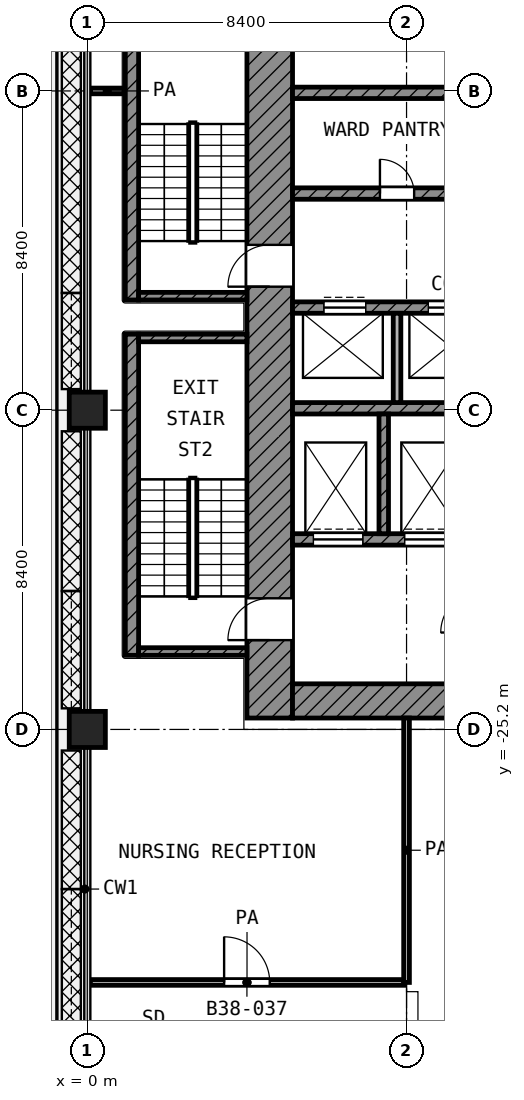
"""IFC4 building model, lengths in metres.
Left out: names, types, materials, properties, quantities, classifications, styles, units other than length and angle.
Written with IfcOpenShell. Run it as: python <this file> out.ifc"""

import sys

from ifc_helpers import new_model, si_unit, direction, frame, frame_2d, origin, origin_2d, place, context, subcontext, project, spatial, rectangle, extrude, element, fill, save


model = new_model("IFC4")
c1 = context("Model", 3, precision=1e-05, world=origin(), true_north=direction((0.0, 1.0)))
c2 = subcontext(c1, "Body", "Model", "MODEL_VIEW")
j1 = project(units=[si_unit("LENGTHUNIT", "METRE"), si_unit("PLANEANGLEUNIT", "RADIAN")], contexts=[c1])
p1 = place(None, origin())
s1 = spatial("IfcSite", under=j1, at=p1, CompositionType="ELEMENT")
p2 = place(p1, origin())
s2 = spatial("IfcBuilding", under=s1, at=p2, CompositionType="ELEMENT")
p3 = place(p2, frame((0.0, 0.0, 166.8)))
s3 = spatial("IfcBuildingStorey", under=s2, at=p3, CompositionType="ELEMENT", Elevation=166.8)
for number, where, z_axis, x_axis in (
    (1, (0.0, -16.8, 0.0), (0.0, 0.0, 1.0), (1.0, 0.0, 0.0)),
    (2, (0.0, -25.2, 0.0), (0.0, 0.0, 1.0), (1.0, 0.0, 0.0)),
):
    element("IfcColumn", number, at=place(p3, frame(where, z_axis=z_axis, x_axis=x_axis)), inside=s3, PredefinedType="COLUMN", context=c2, shape_type="SweptSolid", body=[
        extrude(rectangle(XDim=0.95, YDim=0.95, at=origin_2d()), origin(), (0.0, 0.0, 1.0), 4.2),
    ])
p4 = place(p3, frame((4.8, -24.9, 0.0), z_axis=(0.0, 0.0, 1.0), x_axis=(0.0, 1.0, 0.0)))
e3 = element("IfcWall", 3, at=p4, inside=s3, PredefinedType="SHEAR", context=c2, shape_type="SweptSolid", body=[
    extrude(rectangle(XDim=19.5, YDim=1.2, at=frame_2d((9.75, 0.0))), origin(), (0.0, 0.0, 1.0), 3.6),
])
p5 = place(p4, frame((11.35, 0.0, 0.0)))
e4 = element("IfcOpeningElement", 4, at=p5, cuts=e3, PredefinedType="OPENING", context=c2, shape_type="SweptSolid", body=[
    extrude(rectangle(XDim=1.1, YDim=2.1, at=frame_2d((0.55, 1.05))), frame((0.0, 0.61, 0.0), z_axis=(0.0, -1.0, 0.0), x_axis=(1.0, 0.0, 0.0)), (0.0, 0.0, 1.0), 1.22),
])
p6 = place(p4, frame((2.05, 0.0, 0.0)))
e5 = element("IfcOpeningElement", 5, at=p6, cuts=e3, PredefinedType="OPENING", context=c2, shape_type="SweptSolid", body=[
    extrude(rectangle(XDim=1.1, YDim=2.1, at=frame_2d((0.55, 1.05))), frame((0.0, 0.61, 0.0), z_axis=(0.0, -1.0, 0.0), x_axis=(1.0, 0.0, 0.0)), (0.0, 0.0, 1.0), 1.22),
])
p7 = place(p3, frame((5.4, -24.45, 0.0), z_axis=(0.0, 0.0, 1.0), x_axis=(1.0, 0.0, 0.0)))
e6 = element("IfcWall", 6, at=p7, inside=s3, PredefinedType="SHEAR", context=c2, shape_type="SweptSolid", body=[
    extrude(rectangle(XDim=18.6, YDim=0.9, at=frame_2d((9.3, 0.0))), origin(), (0.0, 0.0, 1.0), 3.6),
])
p8 = place(p7, frame((6.3, 0.0, 0.0)))
e7 = element("IfcOpeningElement", 7, at=p8, cuts=e6, PredefinedType="OPENING", context=c2, shape_type="SweptSolid", body=[
    extrude(rectangle(XDim=1.8, YDim=2.1, at=frame_2d((0.9, 1.05))), frame((0.0, 0.46, 0.0), z_axis=(0.0, -1.0, 0.0), x_axis=(1.0, 0.0, 0.0)), (0.0, 0.0, 1.0), 0.92),
])
p9 = place(p3, frame((5.4, -8.45, 0.0), z_axis=(0.0, 0.0, 1.0), x_axis=(1.0, 0.0, 0.0)))
e8 = element("IfcWall", 8, at=p9, inside=s3, PredefinedType="SHEAR", context=c2, shape_type="SweptSolid", body=[
    extrude(rectangle(XDim=16.65, YDim=0.3, at=frame_2d((8.325, 0.0))), origin(), (0.0, 0.0, 1.0), 3.6),
])
p10 = place(p3, frame((5.4, -11.1, 0.0), z_axis=(0.0, 0.0, 1.0), x_axis=(1.0, 0.0, 0.0)))
e9 = element("IfcWall", 9, at=p10, inside=s3, PredefinedType="SHEAR", context=c2, shape_type="SweptSolid", body=[
    extrude(rectangle(XDim=16.65, YDim=0.3, at=frame_2d((8.325, 0.0))), origin(), (0.0, 0.0, 1.0), 3.6),
])
p11 = place(p10, frame((11.825, 0.0, 0.0)))
e10 = element("IfcOpeningElement", 10, at=p11, cuts=e9, PredefinedType="OPENING", context=c2, shape_type="SweptSolid", body=[
    extrude(rectangle(XDim=1.1, YDim=2.1, at=frame_2d((0.55, 1.05))), frame((0.0, 0.16, 0.0), z_axis=(0.0, -1.0, 0.0), x_axis=(1.0, 0.0, 0.0)), (0.0, 0.0, 1.0), 0.32),
])
p12 = place(p10, frame((14.575, 0.0, 0.0)))
e11 = element("IfcOpeningElement", 11, at=p12, cuts=e9, PredefinedType="OPENING", context=c2, shape_type="SweptSolid", body=[
    extrude(rectangle(XDim=1.1, YDim=2.1, at=frame_2d((0.55, 1.05))), frame((0.0, 0.16, 0.0), z_axis=(0.0, -1.0, 0.0), x_axis=(1.0, 0.0, 0.0)), (0.0, 0.0, 1.0), 0.32),
])
p13 = place(p10, frame((2.3, 0.0, 0.0)))
e12 = element("IfcOpeningElement", 12, at=p13, cuts=e9, PredefinedType="OPENING", context=c2, shape_type="SweptSolid", body=[
    extrude(rectangle(XDim=0.9, YDim=2.1, at=frame_2d((0.45, 1.05))), frame((0.0, 0.16, 0.0), z_axis=(0.0, -1.0, 0.0), x_axis=(1.0, 0.0, 0.0)), (0.0, 0.0, 1.0), 0.32),
])
p14 = place(p10, frame((7.8, 0.0, 0.0)))
e13 = element("IfcOpeningElement", 13, at=p14, cuts=e9, PredefinedType="OPENING", context=c2, shape_type="SweptSolid", body=[
    extrude(rectangle(XDim=0.9, YDim=2.1, at=frame_2d((0.45, 1.05))), frame((0.0, 0.16, 0.0), z_axis=(0.0, -1.0, 0.0), x_axis=(1.0, 0.0, 0.0)), (0.0, 0.0, 1.0), 0.32),
])
p15 = place(p3, frame((5.4, -14.1, 0.0), z_axis=(0.0, 0.0, 1.0), x_axis=(1.0, 0.0, 0.0)))
e14 = element("IfcWall", 14, at=p15, inside=s3, PredefinedType="SHEAR", context=c2, shape_type="SweptSolid", body=[
    extrude(rectangle(XDim=16.65, YDim=0.3, at=frame_2d((8.325, 0.0))), origin(), (0.0, 0.0, 1.0), 3.6),
])
p16 = place(p15, frame((0.825, 0.0, 0.0)))
e15 = element("IfcOpeningElement", 15, at=p16, cuts=e14, PredefinedType="OPENING", context=c2, shape_type="SweptSolid", body=[
    extrude(rectangle(XDim=1.1, YDim=2.1, at=frame_2d((0.55, 1.05))), frame((0.0, 0.16, 0.0), z_axis=(0.0, -1.0, 0.0), x_axis=(1.0, 0.0, 0.0)), (0.0, 0.0, 1.0), 0.32),
])
p17 = place(p15, frame((3.575, 0.0, 0.0)))
e16 = element("IfcOpeningElement", 16, at=p17, cuts=e14, PredefinedType="OPENING", context=c2, shape_type="SweptSolid", body=[
    extrude(rectangle(XDim=1.1, YDim=2.1, at=frame_2d((0.55, 1.05))), frame((0.0, 0.16, 0.0), z_axis=(0.0, -1.0, 0.0), x_axis=(1.0, 0.0, 0.0)), (0.0, 0.0, 1.0), 0.32),
])
p18 = place(p3, frame((5.4, -16.75, 0.0), z_axis=(0.0, 0.0, 1.0), x_axis=(1.0, 0.0, 0.0)))
e17 = element("IfcWall", 17, at=p18, inside=s3, PredefinedType="SHEAR", context=c2, shape_type="SweptSolid", body=[
    extrude(rectangle(XDim=16.65, YDim=0.3, at=frame_2d((8.325, 0.0))), origin(), (0.0, 0.0, 1.0), 3.6),
])
p19 = place(p3, frame((5.4, -20.2, 0.0), z_axis=(0.0, 0.0, 1.0), x_axis=(1.0, 0.0, 0.0)))
e18 = element("IfcWall", 18, at=p19, inside=s3, PredefinedType="SHEAR", context=c2, shape_type="SweptSolid", body=[
    extrude(rectangle(XDim=14.65, YDim=0.3, at=frame_2d((7.325, 0.0))), origin(), (0.0, 0.0, 1.0), 3.6),
])
p20 = place(p19, frame((10.55, 0.0, 0.0)))
e19 = element("IfcOpeningElement", 19, at=p20, cuts=e18, PredefinedType="OPENING", context=c2, shape_type="SweptSolid", body=[
    extrude(rectangle(XDim=1.3, YDim=2.1, at=frame_2d((0.65, 1.05))), frame((0.0, 0.16, 0.0), z_axis=(0.0, -1.0, 0.0), x_axis=(1.0, 0.0, 0.0)), (0.0, 0.0, 1.0), 0.32),
])
p21 = place(p19, frame((12.95, 0.0, 0.0)))
e20 = element("IfcOpeningElement", 20, at=p21, cuts=e18, PredefinedType="OPENING", context=c2, shape_type="SweptSolid", body=[
    extrude(rectangle(XDim=1.3, YDim=2.1, at=frame_2d((0.65, 1.05))), frame((0.0, 0.16, 0.0), z_axis=(0.0, -1.0, 0.0), x_axis=(1.0, 0.0, 0.0)), (0.0, 0.0, 1.0), 0.32),
])
p22 = place(p19, frame((0.55, 0.0, 0.0)))
e21 = element("IfcOpeningElement", 21, at=p22, cuts=e18, PredefinedType="OPENING", context=c2, shape_type="SweptSolid", body=[
    extrude(rectangle(XDim=1.3, YDim=2.1, at=frame_2d((0.65, 1.05))), frame((0.0, 0.16, 0.0), z_axis=(0.0, -1.0, 0.0), x_axis=(1.0, 0.0, 0.0)), (0.0, 0.0, 1.0), 0.32),
])
p23 = place(p19, frame((2.95, 0.0, 0.0)))
e22 = element("IfcOpeningElement", 22, at=p23, cuts=e18, PredefinedType="OPENING", context=c2, shape_type="SweptSolid", body=[
    extrude(rectangle(XDim=1.3, YDim=2.1, at=frame_2d((0.65, 1.05))), frame((0.0, 0.16, 0.0), z_axis=(0.0, -1.0, 0.0), x_axis=(1.0, 0.0, 0.0)), (0.0, 0.0, 1.0), 0.32),
])
p24 = place(p19, frame((7.15, 0.0, 0.0)))
e23 = element("IfcOpeningElement", 23, at=p24, cuts=e18, PredefinedType="OPENING", context=c2, shape_type="SweptSolid", body=[
    extrude(rectangle(XDim=0.9, YDim=2.1, at=frame_2d((0.45, 1.05))), frame((0.0, 0.16, 0.0), z_axis=(0.0, -1.0, 0.0), x_axis=(1.0, 0.0, 0.0)), (0.0, 0.0, 1.0), 0.32),
])
p25 = place(p3, frame((7.8, -20.05, 0.0), z_axis=(0.0, 0.0, 1.0), x_axis=(0.0, 1.0, 0.0)))
e24 = element("IfcWall", 24, at=p25, inside=s3, PredefinedType="SHEAR", context=c2, shape_type="SweptSolid", body=[
    extrude(rectangle(XDim=3.15, YDim=0.25, at=frame_2d((1.575, 0.0))), origin(), (0.0, 0.0, 1.0), 3.6),
])
p26 = place(p3, frame((8.15, -16.6, 0.0), z_axis=(0.0, 0.0, 1.0), x_axis=(0.0, 1.0, 0.0)))
e25 = element("IfcWall", 25, at=p26, inside=s3, PredefinedType="PARTITIONING", context=c2, shape_type="SweptSolid", body=[
    extrude(rectangle(XDim=2.35, YDim=0.2, at=frame_2d((1.175, 0.0))), origin(), (0.0, 0.0, 1.0), 3.6),
])
p27 = place(p3, frame((1.175, -13.9, 0.0), z_axis=(0.0, 0.0, 1.0), x_axis=(0.0, 1.0, 0.0)))
e26 = element("IfcWall", 26, at=p27, inside=s3, PredefinedType="SHEAR", context=c2, shape_type="SweptSolid", body=[
    extrude(rectangle(XDim=8.45, YDim=0.35, at=frame_2d((4.225, 0.0))), origin(), (0.0, 0.0, 1.0), 3.6),
])
p28 = place(p3, frame((1.35, -13.8, 0.0), z_axis=(0.0, 0.0, 1.0), x_axis=(1.0, 0.0, 0.0)))
e27 = element("IfcWall", 27, at=p28, inside=s3, PredefinedType="SHEAR", context=c2, shape_type="SweptSolid", body=[
    extrude(rectangle(XDim=2.85, YDim=0.2, at=frame_2d((1.425, 0.0))), origin(), (0.0, 0.0, 1.0), 3.6),
])
p29 = place(p3, frame((1.175, -23.25, 0.0), z_axis=(0.0, 0.0, 1.0), x_axis=(0.0, 1.0, 0.0)))
e28 = element("IfcWall", 28, at=p29, inside=s3, PredefinedType="SHEAR", context=c2, shape_type="SweptSolid", body=[
    extrude(rectangle(XDim=8.45, YDim=0.35, at=frame_2d((4.225, 0.0))), origin(), (0.0, 0.0, 1.0), 3.6),
])
for number, where, z_axis, x_axis in (
    (29, (1.35, -14.9, 0.0), (0.0, 0.0, 1.0), (1.0, 0.0, 0.0)),
    (30, (1.35, -23.15, 0.0), (0.0, 0.0, 1.0), (1.0, 0.0, 0.0)),
):
    element("IfcWall", number, at=place(p3, frame(where, z_axis=z_axis, x_axis=x_axis)), inside=s3, PredefinedType="SHEAR", context=c2, shape_type="SweptSolid", body=[
        extrude(rectangle(XDim=2.85, YDim=0.2, at=frame_2d((1.425, 0.0))), origin(), (0.0, 0.0, 1.0), 3.6),
    ])
p30 = place(p3, frame((0.08, -31.857, 0.0), z_axis=(0.0, 0.0, 1.0), x_axis=(1.0, 0.0, 0.0)))
e31 = element("IfcWall", 31, at=p30, inside=s3, PredefinedType="PARTITIONING", context=c2, shape_type="SweptSolid", body=[
    extrude(rectangle(XDim=8.245, YDim=0.15, at=frame_2d((4.123, 0.0))), origin(), (0.0, 0.0, 1.0), 3.6),
])
p31 = place(p30, frame((3.52, 0.0, 0.0)))
e32 = element("IfcOpeningElement", 32, at=p31, cuts=e31, PredefinedType="OPENING", context=c2, shape_type="SweptSolid", body=[
    extrude(rectangle(XDim=1.2, YDim=2.1, at=frame_2d((0.6, 1.05))), frame((0.0, 0.085, 0.0), z_axis=(0.0, -1.0, 0.0), x_axis=(1.0, 0.0, 0.0)), (0.0, 0.0, 1.0), 0.17),
])
p32 = place(p3, frame((0.08, -8.4, 0.0), z_axis=(0.0, 0.0, 1.0), x_axis=(1.0, 0.0, 0.0)))
e33 = element("IfcWall", 33, at=p32, inside=s3, PredefinedType="PARTITIONING", context=c2, shape_type="SweptSolid", body=[
    extrude(rectangle(XDim=0.89, YDim=0.15, at=frame_2d((0.445, 0.0))), origin(), (0.0, 0.0, 1.0), 3.6),
])
p33 = place(p3, frame((8.4, -31.857, 0.0), z_axis=(0.0, 0.0, 1.0), x_axis=(0.0, 1.0, 0.0)))
e34 = element("IfcWall", 34, at=p33, inside=s3, PredefinedType="PARTITIONING", context=c2, shape_type="SweptSolid", body=[
    extrude(rectangle(XDim=6.957, YDim=0.15, at=frame_2d((3.479, 0.0))), origin(), (0.0, 0.0, 1.0), 3.6),
])
p34 = place(p16, origin())
e35 = element("IfcDoor", 35, at=p34, inside=s3, OperationType="DOUBLE_DOOR_SLIDING", PredefinedType="DOOR", context=c2, shape_type="SweptSolid", body=[
    extrude(rectangle(XDim=1.1, YDim=2.1, at=frame_2d((0.55, 1.05))), frame((0.0, 0.025, 0.0), z_axis=(0.0, -1.0, 0.0), x_axis=(1.0, 0.0, 0.0)), (0.0, 0.0, 1.0), 0.05),
])
fill(e15, e35)
p35 = place(p17, origin())
e36 = element("IfcDoor", 36, at=p35, inside=s3, OperationType="DOUBLE_DOOR_SLIDING", PredefinedType="DOOR", context=c2, shape_type="SweptSolid", body=[
    extrude(rectangle(XDim=1.1, YDim=2.1, at=frame_2d((0.55, 1.05))), frame((0.0, 0.025, 0.0), z_axis=(0.0, -1.0, 0.0), x_axis=(1.0, 0.0, 0.0)), (0.0, 0.0, 1.0), 0.05),
])
fill(e16, e36)
p36 = place(p22, origin())
e37 = element("IfcDoor", 37, at=p36, inside=s3, OperationType="DOUBLE_DOOR_SLIDING", PredefinedType="DOOR", context=c2, shape_type="SweptSolid", body=[
    extrude(rectangle(XDim=1.3, YDim=2.1, at=frame_2d((0.65, 1.05))), frame((0.0, 0.025, 0.0), z_axis=(0.0, -1.0, 0.0), x_axis=(1.0, 0.0, 0.0)), (0.0, 0.0, 1.0), 0.05),
])
fill(e21, e37)
p37 = place(p23, origin())
e38 = element("IfcDoor", 38, at=p37, inside=s3, OperationType="DOUBLE_DOOR_SLIDING", PredefinedType="DOOR", context=c2, shape_type="SweptSolid", body=[
    extrude(rectangle(XDim=1.3, YDim=2.1, at=frame_2d((0.65, 1.05))), frame((0.0, 0.025, 0.0), z_axis=(0.0, -1.0, 0.0), x_axis=(1.0, 0.0, 0.0)), (0.0, 0.0, 1.0), 0.05),
])
fill(e22, e38)
p38 = place(p5, origin())
e39 = element("IfcDoor", 39, at=p38, inside=s3, OperationType="SINGLE_SWING_LEFT", PredefinedType="DOOR", context=c2, shape_type="SweptSolid", body=[
    extrude(rectangle(XDim=1.1, YDim=2.1, at=frame_2d((0.55, 1.05))), frame((0.0, 0.025, 0.0), z_axis=(0.0, -1.0, 0.0), x_axis=(1.0, 0.0, 0.0)), (0.0, 0.0, 1.0), 0.05),
])
fill(e4, e39)
p39 = place(p6, origin())
e40 = element("IfcDoor", 40, at=p39, inside=s3, OperationType="SINGLE_SWING_LEFT", PredefinedType="DOOR", context=c2, shape_type="SweptSolid", body=[
    extrude(rectangle(XDim=1.1, YDim=2.1, at=frame_2d((0.55, 1.05))), frame((0.0, 0.025, 0.0), z_axis=(0.0, -1.0, 0.0), x_axis=(1.0, 0.0, 0.0)), (0.0, 0.0, 1.0), 0.05),
])
fill(e5, e40)
p40 = place(p13, origin())
e41 = element("IfcDoor", 41, at=p40, inside=s3, OperationType="SINGLE_SWING_LEFT", PredefinedType="DOOR", context=c2, shape_type="SweptSolid", body=[
    extrude(rectangle(XDim=0.9, YDim=2.1, at=frame_2d((0.45, 1.05))), frame((0.0, 0.025, 0.0), z_axis=(0.0, -1.0, 0.0), x_axis=(1.0, 0.0, 0.0)), (0.0, 0.0, 1.0), 0.05),
])
fill(e12, e41)
p41 = place(p31, origin())
e42 = element("IfcDoor", 42, at=p41, inside=s3, OperationType="SINGLE_SWING_LEFT", PredefinedType="DOOR", context=c2, shape_type="SweptSolid", body=[
    extrude(rectangle(XDim=1.2, YDim=2.1, at=frame_2d((0.6, 1.05))), frame((0.0, 0.025, 0.0), z_axis=(0.0, -1.0, 0.0), x_axis=(1.0, 0.0, 0.0)), (0.0, 0.0, 1.0), 0.05),
])
fill(e32, e42)
save(model, sys.argv[1])
